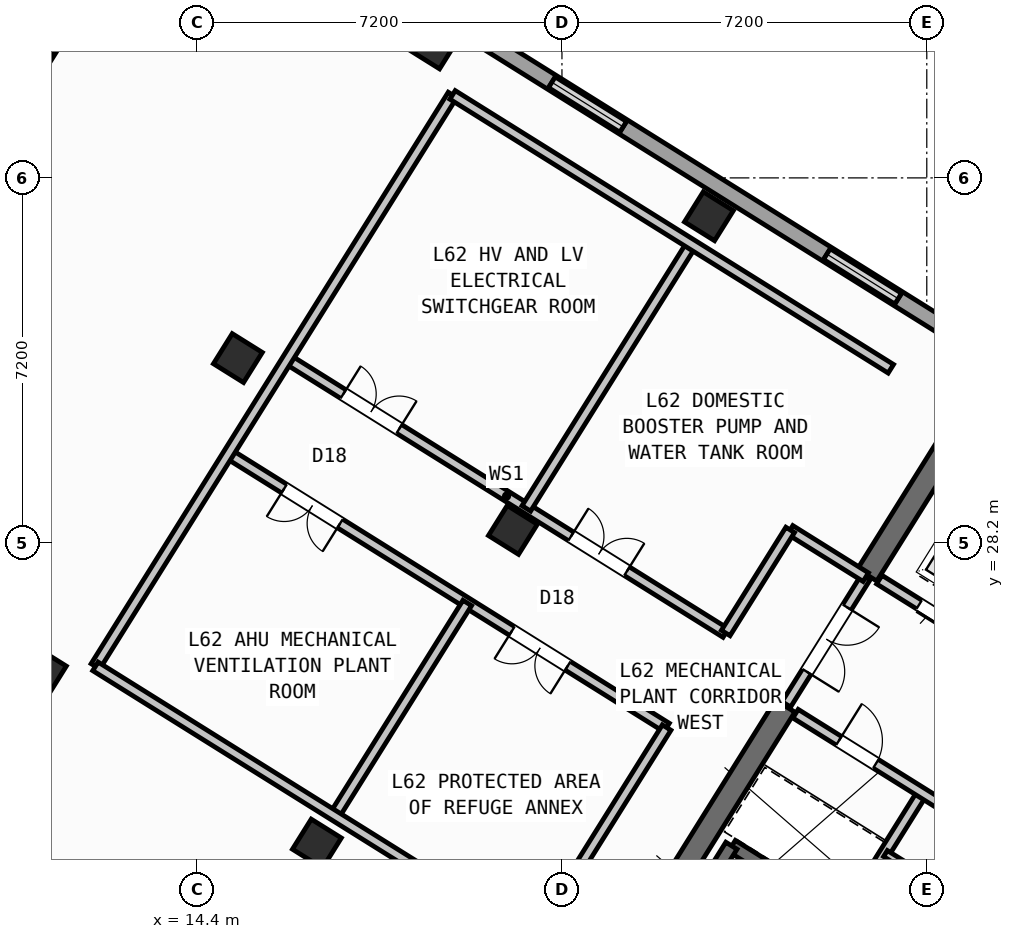
"""IFC4 building model, lengths in metres.
Left out: names, types, materials, properties, quantities, classifications, styles, units other than length and angle.
Written with IfcOpenShell. Run it as: python <this file> out.ifc"""

import sys

from ifc_helpers import new_model, si_unit, direction, frame, frame_2d, origin, origin_2d, place, context, subcontext, project, spatial, rectangle, hollow_rectangle, extrude, source, transform, mapped, element, fill, save


model = new_model("IFC4")
c1 = context("Model", 3, precision=1e-05, world=origin(), true_north=direction((0.0, 1.0)))
c2 = subcontext(c1, "Body", "Model", "MODEL_VIEW")
j1 = project(units=[si_unit("LENGTHUNIT", "METRE"), si_unit("PLANEANGLEUNIT", "RADIAN")], contexts=[c1])
p1 = place(None, origin())
s1 = spatial("IfcSite", under=j1, at=p1, CompositionType="ELEMENT")
p2 = place(p1, origin())
s2 = spatial("IfcBuilding", under=s1, at=p2, CompositionType="ELEMENT")
p3 = place(p2, frame((0.0, 0.0, 245.7)))
s3 = spatial("IfcBuildingStorey", under=s2, at=p3, CompositionType="ELEMENT", Elevation=245.7)
p4 = place(p3, frame((29.544, 30.636, 0.0), z_axis=(0.0, 0.0, 1.0), x_axis=(-0.529902075036, -0.848058836916, 0.0)))
e1 = element("IfcWall", 1, at=p4, inside=s3, PredefinedType="SHEAR", context=c2, shape_type="SweptSolid", body=[
    extrude(rectangle(XDim=3.625, YDim=0.45, at=frame_2d((1.812, 0.0))), origin(), (0.0, 0.0, 1.0), 5.15),
])
p5 = place(p3, frame((26.007, 24.976, 0.0), z_axis=(0.0, 0.0, 1.0), x_axis=(-0.529931155655, -0.848040665456, 0.0)))
e2 = element("IfcWall", 2, at=p5, inside=s3, PredefinedType="SHEAR", context=c2, shape_type="SweptSolid", body=[
    extrude(rectangle(XDim=6.475, YDim=0.45, at=frame_2d((3.238, 0.0))), origin(), (0.0, 0.0, 1.0), 5.15),
])
m1 = source(origin(), c2, "Body", "SweptSolid", [
    extrude(hollow_rectangle(XDim=0.7, YDim=0.7, WallThickness=0.028, at=origin_2d()), origin(), (0.0, 0.0, 1.0), 5.4),
])
for number, where, z_axis, x_axis in (
    (3, (24.5, 34.643, 0.0), (0.0, 0.0, 1.0), (-0.848, 0.53, 0.0)),
    (4, (20.632, 28.452, 0.0), (0.0, 0.0, 1.0), (-0.848, 0.53, 0.0)),
    (5, (16.764, 22.261, 0.0), (0.0, 0.0, 1.0), (-0.848, 0.53, 0.0)),
    (6, (19.073, 38.034, 0.0), (0.0, 0.0, 1.0), (-0.848, 0.53, 0.0)),
    (7, (15.205, 31.844, 0.0), (0.0, 0.0, 1.0), (-0.848, 0.53, 0.0)),
    (8, (11.336, 25.653, 0.0), (0.0, 0.0, 1.0), (-0.848, 0.53, 0.0)),
):
    element("IfcColumn", number, at=place(p3, frame(where, z_axis=z_axis, x_axis=x_axis)), inside=s3, PredefinedType="COLUMN", context=c2, shape_type="MappedRepresentation", body=[
        mapped(m1, transform((0.0, 0.0, 0.0), scale=1.0)),
    ])
p6 = place(p3, frame((29.268, 6.429, 0.0), z_axis=(0.0, 0.0, 1.0), x_axis=(-0.848049971435, 0.529916263149, 0.0)))
e9 = element("IfcWall", 9, at=p6, inside=s3, PredefinedType="STANDARD", context=c2, shape_type="SweptSolid", body=[
    extrude(rectangle(XDim=31.588, YDim=0.32, at=frame_2d((15.794, 0.0))), origin(), (0.0, 0.0, 1.0), 5.15),
])
p7 = place(p6, frame((5.782, 0.0, 0.85)))
e10 = element("IfcOpeningElement", 10, at=p7, cuts=e9, PredefinedType="OPENING", context=c2, shape_type="SweptSolid", body=[
    extrude(rectangle(XDim=1.7, YDim=1.6, at=frame_2d((0.85, 0.8))), frame((0.0, 0.17, 0.0), z_axis=(0.0, -1.0, 0.0), x_axis=(1.0, 0.0, 0.0)), (0.0, 0.0, 1.0), 0.34),
])
p8 = place(p3, frame((2.415, 23.452, 0.0), z_axis=(0.0, 0.0, 1.0), x_axis=(0.52991049553, 0.848053575387, 0.0)))
e11 = element("IfcWall", 11, at=p8, inside=s3, PredefinedType="STANDARD", context=c2, shape_type="SweptSolid", body=[
    extrude(rectangle(XDim=21.587, YDim=0.32, at=frame_2d((10.794, 0.0))), origin(), (0.0, 0.0, 1.0), 4.675),
])
p9 = place(p8, frame((3.094, 0.0, 0.85)))
e12 = element("IfcOpeningElement", 12, at=p9, cuts=e11, PredefinedType="OPENING", context=c2, shape_type="SweptSolid", body=[
    extrude(rectangle(XDim=1.7, YDim=1.6, at=frame_2d((0.85, 0.8))), frame((0.0, 0.17, 0.0), z_axis=(0.0, -1.0, 0.0), x_axis=(1.0, 0.0, 0.0)), (0.0, 0.0, 1.0), 0.34),
])
p10 = place(p8, frame((9.394, 0.0, 0.85)))
e13 = element("IfcOpeningElement", 13, at=p10, cuts=e11, PredefinedType="OPENING", context=c2, shape_type="SweptSolid", body=[
    extrude(rectangle(XDim=1.7, YDim=1.6, at=frame_2d((0.85, 0.8))), frame((0.0, 0.17, 0.0), z_axis=(0.0, -1.0, 0.0), x_axis=(1.0, 0.0, 0.0)), (0.0, 0.0, 1.0), 0.34),
])
p11 = place(p8, frame((16.694, 0.0, 0.85)))
e14 = element("IfcOpeningElement", 14, at=p11, cuts=e11, PredefinedType="OPENING", context=c2, shape_type="SweptSolid", body=[
    extrude(rectangle(XDim=1.7, YDim=1.6, at=frame_2d((0.85, 0.8))), frame((0.0, 0.17, 0.0), z_axis=(0.0, -1.0, 0.0), x_axis=(1.0, 0.0, 0.0)), (0.0, 0.0, 1.0), 0.34),
])
p12 = place(p3, frame((14.138, 41.825, 0.0), z_axis=(0.0, 0.0, 1.0), x_axis=(0.848046498049, -0.529921821731, 0.0)))
e15 = element("IfcWall", 15, at=p12, inside=s3, PredefinedType="STANDARD", context=c2, shape_type="SweptSolid", body=[
    extrude(rectangle(XDim=31.588, YDim=0.32, at=frame_2d((15.794, 0.0))), origin(), (0.0, 0.0, 1.0), 5.15),
])
p13 = place(p12, frame((2.144, 0.0, 0.85)))
e16 = element("IfcOpeningElement", 16, at=p13, cuts=e15, PredefinedType="OPENING", context=c2, shape_type="SweptSolid", body=[
    extrude(rectangle(XDim=1.7, YDim=1.6, at=frame_2d((0.85, 0.8))), frame((0.0, 0.17, 0.0), z_axis=(0.0, -1.0, 0.0), x_axis=(1.0, 0.0, 0.0)), (0.0, 0.0, 1.0), 0.34),
])
p14 = place(p12, frame((8.544, 0.0, 0.85)))
e17 = element("IfcOpeningElement", 17, at=p14, cuts=e15, PredefinedType="OPENING", context=c2, shape_type="SweptSolid", body=[
    extrude(rectangle(XDim=1.7, YDim=1.6, at=frame_2d((0.85, 0.8))), frame((0.0, 0.17, 0.0), z_axis=(0.0, -1.0, 0.0), x_axis=(1.0, 0.0, 0.0)), (0.0, 0.0, 1.0), 0.34),
])
p15 = place(p12, frame((14.944, 0.0, 0.85)))
e18 = element("IfcOpeningElement", 18, at=p15, cuts=e15, PredefinedType="OPENING", context=c2, shape_type="SweptSolid", body=[
    extrude(rectangle(XDim=1.7, YDim=1.6, at=frame_2d((0.85, 0.8))), frame((0.0, 0.17, 0.0), z_axis=(0.0, -1.0, 0.0), x_axis=(1.0, 0.0, 0.0)), (0.0, 0.0, 1.0), 0.34),
])
p16 = place(p12, frame((24.408, 0.0, 0.85)))
e19 = element("IfcOpeningElement", 19, at=p16, cuts=e15, PredefinedType="OPENING", context=c2, shape_type="SweptSolid", body=[
    extrude(rectangle(XDim=1.7, YDim=1.6, at=frame_2d((0.85, 0.8))), frame((0.0, 0.17, 0.0), z_axis=(0.0, -1.0, 0.0), x_axis=(1.0, 0.0, 0.0)), (0.0, 0.0, 1.0), 0.34),
])
p17 = place(p3, frame((31.28, 18.261, 0.0), z_axis=(0.0, 0.0, 1.0), x_axis=(-0.848051618787, 0.529913626805, 0.0)))
e20 = element("IfcWall", 20, at=p17, inside=s3, PredefinedType="SHEAR", context=c2, shape_type="SweptSolid", body=[
    extrude(rectangle(XDim=7.46, YDim=0.26, at=frame_2d((3.73, 0.0))), origin(), (0.0, 0.0, 1.0), 5.15),
])
p18 = place(p17, frame((0.36, 0.0, 0.0)))
e21 = element("IfcOpeningElement", 21, at=p18, cuts=e20, PredefinedType="OPENING", context=c2, shape_type="SweptSolid", body=[
    extrude(rectangle(XDim=0.86, YDim=2.05, at=frame_2d((0.43, 1.025))), frame((0.0, 0.14, 0.0), z_axis=(0.0, -1.0, 0.0), x_axis=(1.0, 0.0, 0.0)), (0.0, 0.0, 1.0), 0.28),
])
p19 = place(p3, frame((24.945, 22.22, 0.0), z_axis=(0.0, 0.0, 1.0), x_axis=(-0.529908658664, -0.84805472316, 0.0)))
e22 = element("IfcWall", 22, at=p19, inside=s3, PredefinedType="SHEAR", context=c2, shape_type="SweptSolid", body=[
    extrude(rectangle(XDim=3.16, YDim=0.26, at=frame_2d((1.58, 0.0))), origin(), (0.0, 0.0, 1.0), 5.15),
])
p20 = place(p3, frame((31.822, 24.998, 0.0), z_axis=(0.0, 0.0, 1.0), x_axis=(-0.848054125777, 0.529909614701, 0.0)))
e23 = element("IfcWall", 23, at=p20, inside=s3, PredefinedType="STANDARD", context=c2, shape_type="SweptSolid", body=[
    extrude(rectangle(XDim=4.668, YDim=0.2, at=frame_2d((2.334, 0.0))), origin(), (0.0, 0.0, 1.0), 5.14),
])
p21 = place(p20, frame((0.52, 0.0, 0.0)))
e24 = element("IfcOpeningElement", 24, at=p21, cuts=e23, PredefinedType="OPENING", context=c2, shape_type="SweptSolid", body=[
    extrude(rectangle(XDim=1.2, YDim=2.15, at=frame_2d((0.6, 1.075))), frame((0.0, 0.11, 0.0), z_axis=(0.0, -1.0, 0.0), x_axis=(1.0, 0.0, 0.0)), (0.0, 0.0, 1.0), 0.22),
])
p22 = place(p20, frame((2.54, 0.0, 0.0)))
e25 = element("IfcOpeningElement", 25, at=p22, cuts=e23, PredefinedType="OPENING", context=c2, shape_type="SweptSolid", body=[
    extrude(rectangle(XDim=1.2, YDim=2.15, at=frame_2d((0.6, 1.075))), frame((0.0, 0.11, 0.0), z_axis=(0.0, -1.0, 0.0), x_axis=(1.0, 0.0, 0.0)), (0.0, 0.0, 1.0), 0.22),
])
p23 = place(p3, frame((28.71, 23.263, 0.0), z_axis=(0.0, 0.0, 1.0), x_axis=(-0.529907497854, -0.848055448493, 0.0)))
e26 = element("IfcWall", 26, at=p23, inside=s3, PredefinedType="STANDARD", context=c2, shape_type="SweptSolid", body=[
    extrude(rectangle(XDim=2.88, YDim=0.2, at=frame_2d((1.44, 0.0))), origin(), (0.0, 0.0, 1.0), 5.14),
])
p24 = place(p3, frame((31.525, 21.504, 0.0), z_axis=(0.0, 0.0, 1.0), x_axis=(-0.848042066329, 0.529928913853, 0.0)))
e27 = element("IfcWall", 27, at=p24, inside=s3, PredefinedType="STANDARD", context=c2, shape_type="SweptSolid", body=[
    extrude(rectangle(XDim=6.268, YDim=0.2, at=frame_2d((3.134, 0.0))), origin(), (0.0, 0.0, 1.0), 5.14),
])
p25 = place(p24, frame((4.4, 0.0, 0.0)))
e28 = element("IfcOpeningElement", 28, at=p25, cuts=e27, PredefinedType="OPENING", context=c2, shape_type="SweptSolid", body=[
    extrude(rectangle(XDim=0.86, YDim=2.05, at=frame_2d((0.43, 1.025))), frame((0.0, 0.11, 0.0), z_axis=(0.0, -1.0, 0.0), x_axis=(1.0, 0.0, 0.0)), (0.0, 0.0, 1.0), 0.22),
])
p26 = place(p24, frame((0.35, 0.0, 0.0)))
e29 = element("IfcOpeningElement", 29, at=p26, cuts=e27, PredefinedType="OPENING", context=c2, shape_type="SweptSolid", body=[
    extrude(rectangle(XDim=0.86, YDim=2.05, at=frame_2d((0.43, 1.025))), frame((0.0, 0.11, 0.0), z_axis=(0.0, -1.0, 0.0), x_axis=(1.0, 0.0, 0.0)), (0.0, 0.0, 1.0), 0.22),
])
p27 = place(p3, frame((30.766, 20.327, 0.0), z_axis=(0.0, 0.0, 1.0), x_axis=(-0.848052663127, 0.529911955482, 0.0)))
e30 = element("IfcWall", 30, at=p27, inside=s3, PredefinedType="PLUMBINGWALL", context=c2, shape_type="SweptSolid", body=[
    extrude(rectangle(XDim=3.28, YDim=0.14, at=frame_2d((1.64, 0.0))), origin(), (0.0, 0.0, 1.0), 5.14),
])
p28 = place(p27, frame((0.25, 0.0, 0.0)))
e31 = element("IfcOpeningElement", 31, at=p28, cuts=e30, PredefinedType="OPENING", context=c2, shape_type="SweptSolid", body=[
    extrude(rectangle(XDim=0.78, YDim=2.05, at=frame_2d((0.39, 1.025))), frame((0.0, 0.08, 0.0), z_axis=(0.0, -1.0, 0.0), x_axis=(1.0, 0.0, 0.0)), (0.0, 0.0, 1.0), 0.16),
])
p29 = place(p27, frame((1.92, 0.0, 0.0)))
e32 = element("IfcOpeningElement", 32, at=p29, cuts=e30, PredefinedType="OPENING", context=c2, shape_type="SweptSolid", body=[
    extrude(rectangle(XDim=0.78, YDim=2.05, at=frame_2d((0.39, 1.025))), frame((0.0, 0.08, 0.0), z_axis=(0.0, -1.0, 0.0), x_axis=(1.0, 0.0, 0.0)), (0.0, 0.0, 1.0), 0.16),
])
p30 = place(p3, frame((24.832, 26.417, 0.0), z_axis=(0.0, 0.0, 1.0), x_axis=(-0.848045364107, 0.529923636401, 0.0)))
e33 = element("IfcWall", 33, at=p30, inside=s3, PredefinedType="STANDARD", context=c2, shape_type="SweptSolid", body=[
    extrude(rectangle(XDim=10.2, YDim=0.2, at=frame_2d((5.1, 0.0))), origin(), (0.0, 0.0, 1.0), 5.14),
])
p31 = place(p30, frame((2.3, 0.0, 0.0)))
e34 = element("IfcOpeningElement", 34, at=p31, cuts=e33, PredefinedType="OPENING", context=c2, shape_type="SweptSolid", body=[
    extrude(rectangle(XDim=1.3, YDim=2.15, at=frame_2d((0.65, 1.075))), frame((0.0, 0.11, 0.0), z_axis=(0.0, -1.0, 0.0), x_axis=(1.0, 0.0, 0.0)), (0.0, 0.0, 1.0), 0.22),
])
p32 = place(p30, frame((7.6, 0.0, 0.0)))
e35 = element("IfcOpeningElement", 35, at=p32, cuts=e33, PredefinedType="OPENING", context=c2, shape_type="SweptSolid", body=[
    extrude(rectangle(XDim=1.3, YDim=2.15, at=frame_2d((0.65, 1.075))), frame((0.0, 0.11, 0.0), z_axis=(0.0, -1.0, 0.0), x_axis=(1.0, 0.0, 0.0)), (0.0, 0.0, 1.0), 0.22),
])
p33 = place(p3, frame((23.666, 24.552, 0.0), z_axis=(0.0, 0.0, 1.0), x_axis=(-0.848038642463, 0.529934393004, 0.0)))
e36 = element("IfcWall", 36, at=p33, inside=s3, PredefinedType="STANDARD", context=c2, shape_type="SweptSolid", body=[
    extrude(rectangle(XDim=10.2, YDim=0.2, at=frame_2d((5.1, 0.0))), origin(), (0.0, 0.0, 1.0), 5.14),
])
p34 = place(p33, frame((2.3, 0.0, 0.0)))
e37 = element("IfcOpeningElement", 37, at=p34, cuts=e36, PredefinedType="OPENING", context=c2, shape_type="SweptSolid", body=[
    extrude(rectangle(XDim=1.3, YDim=2.15, at=frame_2d((0.65, 1.075))), frame((0.0, 0.11, 0.0), z_axis=(0.0, -1.0, 0.0), x_axis=(1.0, 0.0, 0.0)), (0.0, 0.0, 1.0), 0.22),
])
p35 = place(p33, frame((7.6, 0.0, 0.0)))
e38 = element("IfcOpeningElement", 38, at=p35, cuts=e36, PredefinedType="OPENING", context=c2, shape_type="SweptSolid", body=[
    extrude(rectangle(XDim=1.3, YDim=2.15, at=frame_2d((0.65, 1.075))), frame((0.0, 0.11, 0.0), z_axis=(0.0, -1.0, 0.0), x_axis=(1.0, 0.0, 0.0)), (0.0, 0.0, 1.0), 0.22),
])
p36 = place(p3, frame((19.441, 37.038, 0.0), z_axis=(0.0, 0.0, 1.0), x_axis=(-0.529936237412, -0.848037489901, 0.0)))
e39 = element("IfcWall", 39, at=p36, inside=s3, PredefinedType="STANDARD", context=c2, shape_type="SweptSolid", body=[
    extrude(rectangle(XDim=13.3, YDim=0.2, at=frame_2d((6.65, 0.0))), origin(), (0.0, 0.0, 1.0), 5.14),
])
p37 = place(p3, frame((27.596, 27.52, 0.0), z_axis=(0.0, 0.0, 1.0), x_axis=(-0.529865479138, -0.848081702443, 0.0)))
e40 = element("IfcWall", 40, at=p37, inside=s3, PredefinedType="STANDARD", context=c2, shape_type="SweptSolid", body=[
    extrude(rectangle(XDim=2.96, YDim=0.2, at=frame_2d((1.48, 0.0))), origin(), (0.0, 0.0, 1.0), 5.14),
])
p38 = place(p37, frame((0.7, 0.0, 0.0)))
e41 = element("IfcOpeningElement", 41, at=p38, cuts=e40, PredefinedType="OPENING", context=c2, shape_type="SweptSolid", body=[
    extrude(rectangle(XDim=1.5, YDim=2.15, at=frame_2d((0.75, 1.075))), frame((0.0, 0.11, 0.0), z_axis=(0.0, -1.0, 0.0), x_axis=(1.0, 0.0, 0.0)), (0.0, 0.0, 1.0), 0.22),
])
p39 = place(p3, frame((27.596, 27.52, 0.0), z_axis=(0.0, 0.0, 1.0), x_axis=(-0.848037269931, 0.529936589422, 0.0)))
e42 = element("IfcWall", 42, at=p39, inside=s3, PredefinedType="STANDARD", context=c2, shape_type="SweptSolid", body=[
    extrude(rectangle(XDim=1.76, YDim=0.2, at=frame_2d((0.88, 0.0))), origin(), (0.0, 0.0, 1.0), 5.14),
])
p40 = place(p3, frame((26.104, 28.453, 0.0), z_axis=(0.0, 0.0, 1.0), x_axis=(-0.529880066358, -0.848072588448, 0.0)))
e43 = element("IfcWall", 43, at=p40, inside=s3, PredefinedType="STANDARD", context=c2, shape_type="SweptSolid", body=[
    extrude(rectangle(XDim=2.4, YDim=0.2, at=frame_2d((1.2, 0.0))), origin(), (0.0, 0.0, 1.0), 5.14),
])
p41 = place(p3, frame((23.666, 24.552, 0.0), z_axis=(0.0, 0.0, 1.0), x_axis=(-0.529912392506, -0.848052390049, 0.0)))
e44 = element("IfcWall", 44, at=p41, inside=s3, PredefinedType="STANDARD", context=c2, shape_type="SweptSolid", body=[
    extrude(rectangle(XDim=10.65, YDim=0.2, at=frame_2d((5.325, 0.0))), origin(), (0.0, 0.0, 1.0), 5.14),
])
p42 = place(p3, frame((19.731, 27.01, 0.0), z_axis=(0.0, 0.0, 1.0), x_axis=(-0.529896970672, -0.848062026312, 0.0)))
e45 = element("IfcWall", 45, at=p42, inside=s3, PredefinedType="STANDARD", context=c2, shape_type="SweptSolid", body=[
    extrude(rectangle(XDim=4.95, YDim=0.2, at=frame_2d((2.475, 0.0))), origin(), (0.0, 0.0, 1.0), 4.675),
])
p43 = place(p3, frame((24.156, 34.092, 0.0), z_axis=(0.0, 0.0, 1.0), x_axis=(-0.529934707271, -0.84803844608, 0.0)))
e46 = element("IfcWall", 46, at=p43, inside=s3, PredefinedType="STANDARD", context=c2, shape_type="SweptSolid", body=[
    extrude(rectangle(XDim=6.15, YDim=0.2, at=frame_2d((3.075, 0.0))), origin(), (0.0, 0.0, 1.0), 4.675),
])
p44 = place(p3, frame((21.043, 20.354, 0.0), z_axis=(0.0, 0.0, 1.0), x_axis=(-0.848045364107, 0.529923636401, 0.0)))
e47 = element("IfcWall", 47, at=p44, inside=s3, PredefinedType="STANDARD", context=c2, shape_type="SweptSolid", body=[
    extrude(rectangle(XDim=10.2, YDim=0.2, at=frame_2d((5.1, 0.0))), origin(), (0.0, 0.0, 1.0), 5.14),
])
p45 = place(p3, frame((28.091, 31.633, 0.0), z_axis=(0.0, 0.0, 1.0), x_axis=(-0.848049399204, 0.529917178916, 0.0)))
e48 = element("IfcWall", 48, at=p45, inside=s3, PredefinedType="STANDARD", context=c2, shape_type="SweptSolid", body=[
    extrude(rectangle(XDim=10.2, YDim=0.2, at=frame_2d((5.1, 0.0))), origin(), (0.0, 0.0, 1.0), 5.14),
])
m2 = source(origin(), c2, "Body", "SweptSolid", [
    extrude(rectangle(XDim=1.7, YDim=1.6, at=frame_2d((0.85, 0.8))), frame((0.0, 0.03, 0.0), z_axis=(0.0, -1.0, 0.0), x_axis=(1.0, 0.0, 0.0)), (0.0, 0.0, 1.0), 0.06),
])
p46 = place(p11, origin())
e49 = element("IfcWindow", 49, at=p46, inside=s3, PartitioningType="SINGLE_PANEL", PredefinedType="WINDOW", context=c2, shape_type="MappedRepresentation", body=[
    mapped(m2, transform((0.0, 0.0, 0.0), scale=1.0)),
])
fill(e14, e49)
p47 = place(p14, origin())
e50 = element("IfcWindow", 50, at=p47, inside=s3, PartitioningType="SINGLE_PANEL", PredefinedType="WINDOW", context=c2, shape_type="MappedRepresentation", body=[
    mapped(m2, transform((0.0, 0.0, 0.0), scale=1.0)),
])
fill(e17, e50)
p48 = place(p15, origin())
e51 = element("IfcWindow", 51, at=p48, inside=s3, PartitioningType="SINGLE_PANEL", PredefinedType="WINDOW", context=c2, shape_type="MappedRepresentation", body=[
    mapped(m2, transform((0.0, 0.0, 0.0), scale=1.0)),
])
fill(e18, e51)
m3 = source(origin(), c2, "Body", "SweptSolid", [
    extrude(rectangle(XDim=1.2, YDim=2.15, at=frame_2d((0.6, 1.075))), frame((0.0, 0.025, 0.0), z_axis=(0.0, -1.0, 0.0), x_axis=(1.0, 0.0, 0.0)), (0.0, 0.0, 1.0), 0.05),
])
p49 = place(p22, origin())
e52 = element("IfcDoor", 52, at=p49, inside=s3, OperationType="DOUBLE_DOOR_SLIDING", PredefinedType="DOOR", context=c2, shape_type="MappedRepresentation", body=[
    mapped(m3, transform((0.0, 0.0, 0.0), scale=1.0)),
])
fill(e25, e52)
m4 = source(origin(), c2, "Body", "SweptSolid", [
    extrude(rectangle(XDim=0.86, YDim=2.05, at=frame_2d((0.43, 1.025))), frame((0.0, 0.025, 0.0), z_axis=(0.0, -1.0, 0.0), x_axis=(1.0, 0.0, 0.0)), (0.0, 0.0, 1.0), 0.05),
])
p50 = place(p25, frame((0.86, 0.0, 0.0), z_axis=(0.0, 0.0, 1.0), x_axis=(-1.0, 0.0, 0.0)))
e53 = element("IfcDoor", 53, at=p50, inside=s3, OperationType="SINGLE_SWING_LEFT", PredefinedType="DOOR", context=c2, shape_type="MappedRepresentation", body=[
    mapped(m4, transform((0.0, 0.0, 0.0), scale=1.0)),
])
fill(e28, e53)
m5 = source(origin(), c2, "Body", "SweptSolid", [
    extrude(rectangle(XDim=1.5, YDim=2.15, at=frame_2d((0.75, 1.075))), frame((0.0, 0.025, 0.0), z_axis=(0.0, -1.0, 0.0), x_axis=(1.0, 0.0, 0.0)), (0.0, 0.0, 1.0), 0.05),
])
p51 = place(p38, origin())
e54 = element("IfcDoor", 54, at=p51, inside=s3, OperationType="DOUBLE_DOOR_SINGLE_SWING", PredefinedType="DOOR", context=c2, shape_type="MappedRepresentation", body=[
    mapped(m5, transform((0.0, 0.0, 0.0), scale=1.0)),
])
fill(e41, e54)
m6 = source(origin(), c2, "Body", "SweptSolid", [
    extrude(rectangle(XDim=1.3, YDim=2.15, at=frame_2d((0.65, 1.075))), frame((0.0, 0.025, 0.0), z_axis=(0.0, -1.0, 0.0), x_axis=(1.0, 0.0, 0.0)), (0.0, 0.0, 1.0), 0.05),
])
p52 = place(p34, origin())
e55 = element("IfcDoor", 55, at=p52, inside=s3, OperationType="DOUBLE_DOOR_SINGLE_SWING", PredefinedType="DOOR", context=c2, shape_type="MappedRepresentation", body=[
    mapped(m6, transform((0.0, 0.0, 0.0), scale=1.0)),
])
fill(e37, e55)
p53 = place(p35, origin())
e56 = element("IfcDoor", 56, at=p53, inside=s3, OperationType="DOUBLE_DOOR_SINGLE_SWING", PredefinedType="DOOR", context=c2, shape_type="MappedRepresentation", body=[
    mapped(m6, transform((0.0, 0.0, 0.0), scale=1.0)),
])
fill(e38, e56)
p54 = place(p31, frame((1.3, 0.0, 0.0), z_axis=(0.0, 0.0, 1.0), x_axis=(-1.0, 0.0, 0.0)))
e57 = element("IfcDoor", 57, at=p54, inside=s3, OperationType="DOUBLE_DOOR_SINGLE_SWING", PredefinedType="DOOR", context=c2, shape_type="MappedRepresentation", body=[
    mapped(m6, transform((0.0, 0.0, 0.0), scale=1.0)),
])
fill(e34, e57)
p55 = place(p32, frame((1.3, 0.0, 0.0), z_axis=(0.0, 0.0, 1.0), x_axis=(-1.0, 0.0, 0.0)))
e58 = element("IfcDoor", 58, at=p55, inside=s3, OperationType="DOUBLE_DOOR_SINGLE_SWING", PredefinedType="DOOR", context=c2, shape_type="MappedRepresentation", body=[
    mapped(m6, transform((0.0, 0.0, 0.0), scale=1.0)),
])
fill(e35, e58)
save(model, sys.argv[1])
